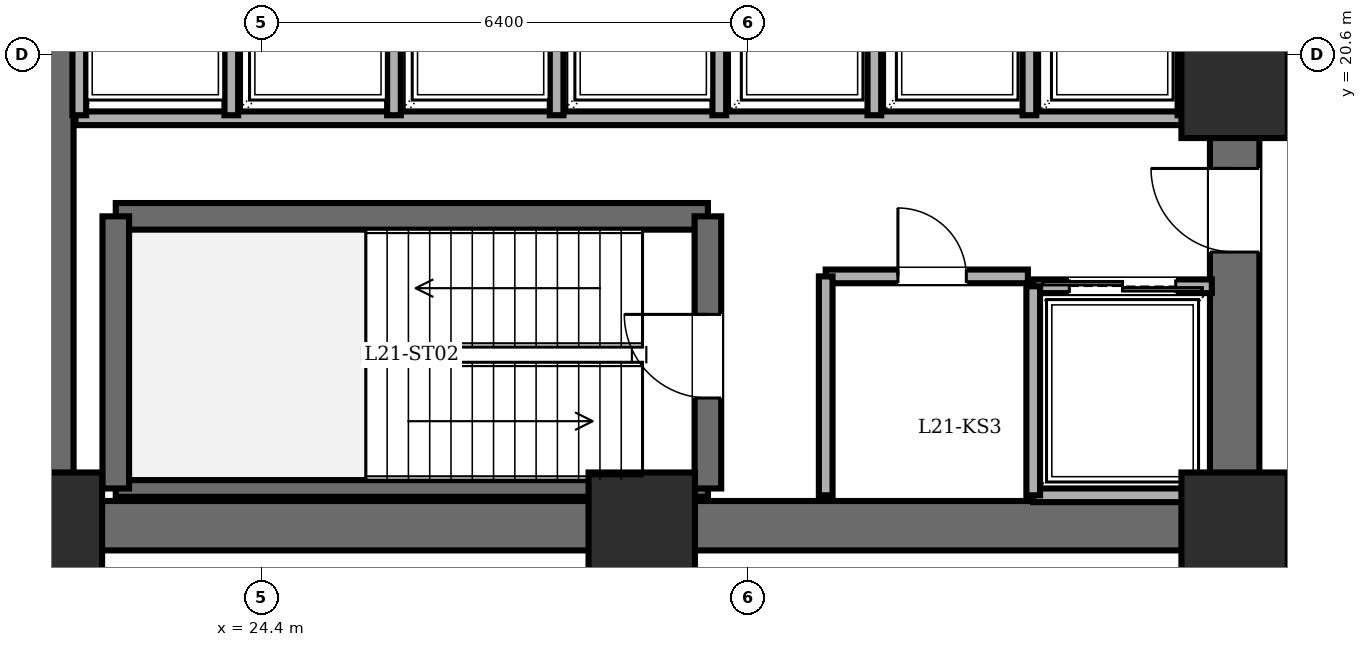
"""IFC4 building model, lengths in metres.
Left out: names, types, materials, properties, quantities, classifications, styles, units other than length and angle.
Written with IfcOpenShell. Run it as: python <this file> out.ifc"""

import sys

from ifc_helpers import new_model, si_unit, direction, frame, frame_2d, origin, origin_2d, place, context, subcontext, project, spatial, rectangle, extrude, element, fill, save


model = new_model("IFC4")
c1 = context("Model", 3, precision=1e-05, world=origin(), true_north=direction((0.0, 1.0)))
c2 = subcontext(c1, "Body", "Model", "MODEL_VIEW")
j1 = project(units=[si_unit("LENGTHUNIT", "METRE"), si_unit("PLANEANGLEUNIT", "RADIAN")], contexts=[c1])
p1 = place(None, origin())
s1 = spatial("IfcSite", under=j1, at=p1, CompositionType="ELEMENT")
p2 = place(p1, origin())
s2 = spatial("IfcBuilding", under=s1, at=p2, CompositionType="ELEMENT")
p3 = place(p2, frame((0.0, 0.0, 81.2)))
s3 = spatial("IfcBuildingStorey", under=s2, at=p3, CompositionType="ELEMENT", Elevation=81.2)
for number, where, z_axis, x_axis in (
    (1, (21.6, 14.4, 0.0), (0.0, 0.0, 1.0), (1.0, 0.0, 0.0)),
    (2, (29.4, 14.4, 0.0), (0.0, 0.0, 1.0), (1.0, 0.0, 0.0)),
    (3, (37.2, 14.4, 0.0), (0.0, 0.0, 1.0), (1.0, 0.0, 0.0)),
    (4, (37.2, 20.2, 0.0), (0.0, 0.0, 1.0), (1.0, 0.0, 0.0)),
):
    element("IfcColumn", number, at=place(p3, frame(where, z_axis=z_axis, x_axis=x_axis)), inside=s3, PredefinedType="COLUMN", context=c2, shape_type="SweptSolid", body=[
        extrude(rectangle(XDim=1.4, YDim=1.4, at=origin_2d()), origin(), (0.0, 0.0, 1.0), 5.1),
    ])
p4 = place(p3, frame((21.6, 14.4, 0.0), z_axis=(0.0, 0.0, 1.0), x_axis=(0.0, 1.0, 0.0)))
e5 = element("IfcWall", 5, at=p4, inside=s3, PredefinedType="SHEAR", context=c2, shape_type="SweptSolid", body=[
    extrude(rectangle(XDim=19.2, YDim=0.65, at=frame_2d((9.6, 0.0))), origin(), (0.0, 0.0, 1.0), 4.9),
])
p5 = place(p3, frame((37.2, 14.4, 0.0), z_axis=(0.0, 0.0, 1.0), x_axis=(-1.0, 0.0, 0.0)))
e6 = element("IfcWall", 6, at=p5, inside=s3, PredefinedType="SHEAR", context=c2, shape_type="SweptSolid", body=[
    extrude(rectangle(XDim=15.6, YDim=0.65, at=frame_2d((7.8, 0.0))), origin(), (0.0, 0.0, 1.0), 4.9),
])
p6 = place(p3, frame((37.2, 14.4, 0.0), z_axis=(0.0, 0.0, 1.0), x_axis=(0.0, 1.0, 0.0)))
e7 = element("IfcWall", 7, at=p6, inside=s3, PredefinedType="SHEAR", context=c2, shape_type="SweptSolid", body=[
    extrude(rectangle(XDim=19.2, YDim=0.65, at=frame_2d((9.6, 0.0))), origin(), (0.0, 0.0, 1.0), 4.9),
])
p7 = place(p6, frame((15.8, 0.0, 0.0)))
e8 = element("IfcOpeningElement", 8, at=p7, cuts=e7, PredefinedType="OPENING", context=c2, shape_type="SweptSolid", body=[
    extrude(rectangle(XDim=1.15, YDim=2.15, at=frame_2d((0.575, 1.075))), frame((0.0, 0.335, 0.0), z_axis=(0.0, -1.0, 0.0), x_axis=(1.0, 0.0, 0.0)), (0.0, 0.0, 1.0), 0.67),
])
p8 = place(p6, frame((3.6, 0.0, 0.0)))
e9 = element("IfcOpeningElement", 9, at=p8, cuts=e7, PredefinedType="OPENING", context=c2, shape_type="SweptSolid", body=[
    extrude(rectangle(XDim=1.1, YDim=2.15, at=frame_2d((0.55, 1.075))), frame((0.0, 0.335, 0.0), z_axis=(0.0, -1.0, 0.0), x_axis=(1.0, 0.0, 0.0)), (0.0, 0.0, 1.0), 0.67),
])
p9 = place(p6, frame((8.6, 0.0, 0.0)))
e10 = element("IfcOpeningElement", 10, at=p9, cuts=e7, PredefinedType="OPENING", context=c2, shape_type="SweptSolid", body=[
    extrude(rectangle(XDim=1.3, YDim=2.2, at=frame_2d((0.65, 1.1))), frame((0.0, 0.335, 0.0), z_axis=(0.0, -1.0, 0.0), x_axis=(1.0, 0.0, 0.0)), (0.0, 0.0, 1.0), 0.67),
])
p10 = place(p3, frame((22.48, 18.47, 0.0), z_axis=(0.0, 0.0, 1.0), x_axis=(1.0, 0.0, 0.0)))
e11 = element("IfcWall", 11, at=p10, inside=s3, PredefinedType="SOLIDWALL", context=c2, shape_type="SweptSolid", body=[
    extrude(rectangle(XDim=7.79, YDim=0.35, at=frame_2d((3.895, 0.0))), origin(), (0.0, 0.0, 1.0), 4.9),
])
p11 = place(p3, frame((22.48, 14.89, 0.0), z_axis=(0.0, 0.0, 1.0), x_axis=(1.0, 0.0, 0.0)))
e12 = element("IfcWall", 12, at=p11, inside=s3, PredefinedType="PARTITIONING", context=c2, shape_type="SweptSolid", body=[
    extrude(rectangle(XDim=7.79, YDim=0.22, at=frame_2d((3.895, 0.0))), origin(), (0.0, 0.0, 1.0), 4.9),
])
p12 = place(p3, frame((22.48, 14.89, 0.0), z_axis=(0.0, 0.0, 1.0), x_axis=(0.0, 1.0, 0.0)))
e13 = element("IfcWall", 13, at=p12, inside=s3, PredefinedType="SOLIDWALL", context=c2, shape_type="SweptSolid", body=[
    extrude(rectangle(XDim=3.58, YDim=0.35, at=frame_2d((1.79, 0.0))), origin(), (0.0, 0.0, 1.0), 4.9),
])
p13 = place(p3, frame((30.27, 14.89, 0.0), z_axis=(0.0, 0.0, 1.0), x_axis=(0.0, 1.0, 0.0)))
e14 = element("IfcWall", 14, at=p13, inside=s3, PredefinedType="SOLIDWALL", context=c2, shape_type="SweptSolid", body=[
    extrude(rectangle(XDim=3.58, YDim=0.35, at=frame_2d((1.79, 0.0))), origin(), (0.0, 0.0, 1.0), 4.9),
])
p14 = place(p13, frame((1.19, 0.0, 0.0)))
e15 = element("IfcOpeningElement", 15, at=p14, cuts=e14, PredefinedType="OPENING", context=c2, shape_type="SweptSolid", body=[
    extrude(rectangle(XDim=1.1, YDim=2.15, at=frame_2d((0.55, 1.075))), frame((0.0, 0.185, 0.0), z_axis=(0.0, -1.0, 0.0), x_axis=(1.0, 0.0, 0.0)), (0.0, 0.0, 1.0), 0.37),
])
p15 = place(p3, frame((21.95, 19.76, 0.0), z_axis=(0.0, 0.0, 1.0), x_axis=(1.0, 0.0, 0.0)))
e16 = element("IfcWall", 16, at=p15, inside=s3, PredefinedType="PARTITIONING", context=c2, shape_type="SweptSolid", body=[
    extrude(rectangle(XDim=14.87, YDim=0.18, at=frame_2d((7.435, 0.0))), origin(), (0.0, 0.0, 1.0), 4.9),
])
p16 = place(p3, frame((31.82, 17.68, 0.0), z_axis=(0.0, 0.0, 1.0), x_axis=(1.0, 0.0, 0.0)))
e17 = element("IfcWall", 17, at=p16, inside=s3, PredefinedType="PARTITIONING", context=c2, shape_type="SweptSolid", body=[
    extrude(rectangle(XDim=2.66, YDim=0.18, at=frame_2d((1.33, 0.0))), origin(), (0.0, 0.0, 1.0), 4.9),
])
p17 = place(p16, frame((0.95, 0.0, 0.0)))
e18 = element("IfcOpeningElement", 18, at=p17, cuts=e17, PredefinedType="OPENING", context=c2, shape_type="SweptSolid", body=[
    extrude(rectangle(XDim=0.9, YDim=2.05, at=frame_2d((0.45, 1.025))), frame((0.0, 0.1, 0.0), z_axis=(0.0, -1.0, 0.0), x_axis=(1.0, 0.0, 0.0)), (0.0, 0.0, 1.0), 0.2),
])
p18 = place(p3, frame((31.82, 14.8, 0.0), z_axis=(0.0, 0.0, 1.0), x_axis=(0.0, 1.0, 0.0)))
e19 = element("IfcWall", 19, at=p18, inside=s3, PredefinedType="PARTITIONING", context=c2, shape_type="SweptSolid", body=[
    extrude(rectangle(XDim=2.88, YDim=0.18, at=frame_2d((1.44, 0.0))), origin(), (0.0, 0.0, 1.0), 4.9),
])
p19 = place(p3, frame((34.55, 17.55, 0.0), z_axis=(0.0, 0.0, 1.0), x_axis=(1.0, 0.0, 0.0)))
e20 = element("IfcWall", 20, at=p19, inside=s3, PredefinedType="PARTITIONING", context=c2, shape_type="SweptSolid", body=[
    extrude(rectangle(XDim=2.35, YDim=0.18, at=frame_2d((1.175, 0.0))), origin(), (0.0, 0.0, 1.0), 4.9),
])
p20 = place(p19, frame((0.475, 0.0, 0.0)))
e21 = element("IfcOpeningElement", 21, at=p20, cuts=e20, PredefinedType="OPENING", context=c2, shape_type="SweptSolid", body=[
    extrude(rectangle(XDim=1.4, YDim=2.3, at=frame_2d((0.7, 1.15))), frame((0.0, 0.1, 0.0), z_axis=(0.0, -1.0, 0.0), x_axis=(1.0, 0.0, 0.0)), (0.0, 0.0, 1.0), 0.2),
])
p21 = place(p3, frame((36.9, 14.8, 0.0), z_axis=(0.0, 0.0, 1.0), x_axis=(-1.0, 0.0, 0.0)))
e22 = element("IfcWall", 22, at=p21, inside=s3, PredefinedType="PARTITIONING", context=c2, shape_type="SweptSolid", body=[
    extrude(rectangle(XDim=2.35, YDim=0.18, at=frame_2d((1.175, 0.0))), origin(), (0.0, 0.0, 1.0), 4.9),
])
p22 = place(p3, frame((34.55, 17.55, 0.0), z_axis=(0.0, 0.0, 1.0), x_axis=(0.0, -1.0, 0.0)))
e23 = element("IfcWall", 23, at=p22, inside=s3, PredefinedType="PARTITIONING", context=c2, shape_type="SweptSolid", body=[
    extrude(rectangle(XDim=2.75, YDim=0.18, at=frame_2d((1.375, 0.0))), origin(), (0.0, 0.0, 1.0), 4.9),
])
for number, where, z_axis, x_axis in (
    (24, (24.0, 19.8, 0.0), (0.0, 0.0, 1.0), (0.0, 1.0, 0.0)),
    (25, (22.0, 22.3, 0.0), (0.0, 0.0, 1.0), (0.0, -1.0, 0.0)),
    (26, (26.14, 19.8, 0.0), (0.0, 0.0, 1.0), (0.0, 1.0, 0.0)),
    (27, (28.28, 19.8, 0.0), (0.0, 0.0, 1.0), (0.0, 1.0, 0.0)),
    (28, (30.42, 19.8, 0.0), (0.0, 0.0, 1.0), (0.0, 1.0, 0.0)),
    (29, (32.46, 19.8, 0.0), (0.0, 0.0, 1.0), (0.0, 1.0, 0.0)),
    (30, (34.5, 19.8, 0.0), (0.0, 0.0, 1.0), (0.0, 1.0, 0.0)),
    (31, (36.54, 19.8, 0.0), (0.0, 0.0, 1.0), (0.0, 1.0, 0.0)),
):
    element("IfcWall", number, at=place(p3, frame(where, z_axis=z_axis, x_axis=x_axis)), inside=s3, PredefinedType="PARTITIONING", context=c2, shape_type="SweptSolid", body=[
        extrude(rectangle(XDim=2.5, YDim=0.18, at=frame_2d((1.25, 0.0))), origin(), (0.0, 0.0, 1.0), 4.9),
    ])
p23 = place(p14, origin())
e32 = element("IfcDoor", 32, at=p23, inside=s3, OperationType="SINGLE_SWING_RIGHT", PredefinedType="DOOR", context=c2, shape_type="SweptSolid", body=[
    extrude(rectangle(XDim=1.1, YDim=2.15, at=frame_2d((0.55, 1.075))), frame((0.0, 0.025, 0.0), z_axis=(0.0, -1.0, 0.0), x_axis=(1.0, 0.0, 0.0)), (0.0, 0.0, 1.0), 0.05),
])
fill(e15, e32)
p24 = place(p8, origin())
e33 = element("IfcDoor", 33, at=p24, inside=s3, OperationType="SINGLE_SWING_RIGHT", PredefinedType="DOOR", context=c2, shape_type="SweptSolid", body=[
    extrude(rectangle(XDim=1.1, YDim=2.15, at=frame_2d((0.55, 1.075))), frame((0.0, 0.025, 0.0), z_axis=(0.0, -1.0, 0.0), x_axis=(1.0, 0.0, 0.0)), (0.0, 0.0, 1.0), 0.05),
])
fill(e9, e33)
p25 = place(p17, origin())
e34 = element("IfcDoor", 34, at=p25, inside=s3, OperationType="SINGLE_SWING_LEFT", PredefinedType="DOOR", context=c2, shape_type="SweptSolid", body=[
    extrude(rectangle(XDim=0.9, YDim=2.05, at=frame_2d((0.45, 1.025))), frame((0.0, 0.025, 0.0), z_axis=(0.0, -1.0, 0.0), x_axis=(1.0, 0.0, 0.0)), (0.0, 0.0, 1.0), 0.05),
])
fill(e18, e34)
p26 = place(p20, origin())
e35 = element("IfcDoor", 35, at=p26, inside=s3, OperationType="DOUBLE_DOOR_SLIDING", PredefinedType="DOOR", context=c2, shape_type="SweptSolid", body=[
    extrude(rectangle(XDim=1.4, YDim=2.3, at=frame_2d((0.7, 1.15))), frame((0.0, 0.025, 0.0), z_axis=(0.0, -1.0, 0.0), x_axis=(1.0, 0.0, 0.0)), (0.0, 0.0, 1.0), 0.05),
])
fill(e21, e35)
save(model, sys.argv[1])
